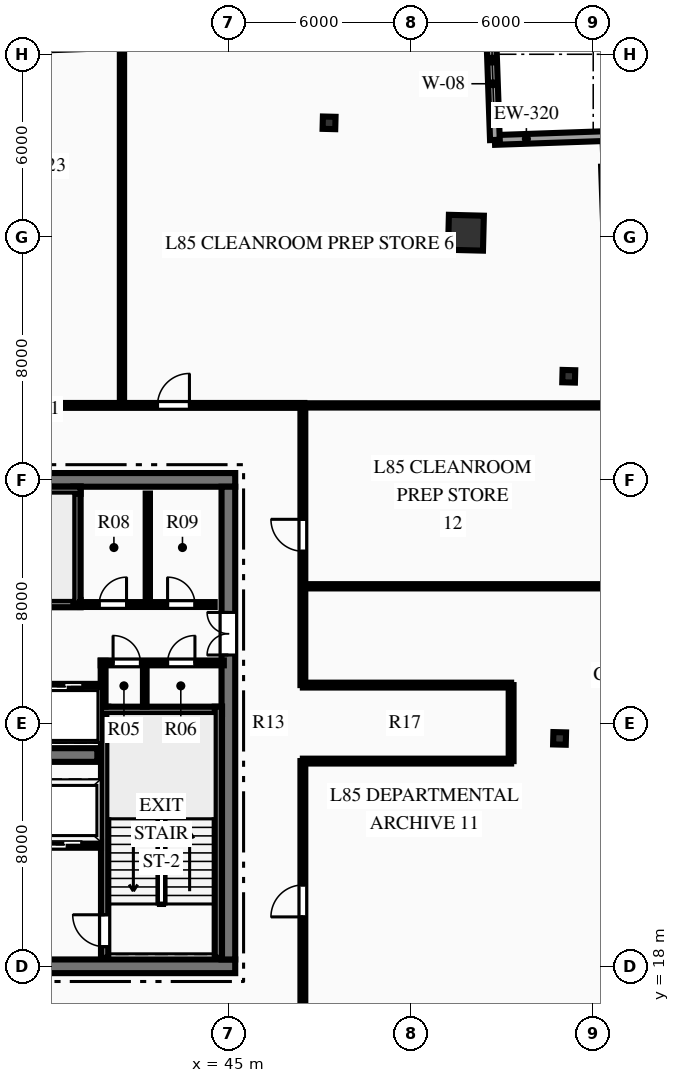
"""IFC4 building model, lengths in metres.
Left out: names, types, materials, properties, quantities, classifications, styles, units other than length and angle.
Written with IfcOpenShell. Run it as: python <this file> out.ifc"""

import sys

from ifc_helpers import new_model, si_unit, direction, frame, frame_2d, origin, origin_2d, place, context, subcontext, project, spatial, rectangle, hollow_rectangle, i_section, extrude, element, fill, save


model = new_model("IFC4")
c1 = context("Model", 3, precision=1e-05, world=origin(), true_north=direction((0.0, 1.0)))
c2 = subcontext(c1, "Body", "Model", "MODEL_VIEW")
j1 = project(units=[si_unit("LENGTHUNIT", "METRE"), si_unit("PLANEANGLEUNIT", "RADIAN")], contexts=[c1])
p1 = place(None, origin())
s1 = spatial("IfcSite", under=j1, at=p1, CompositionType="ELEMENT")
p2 = place(p1, origin())
s2 = spatial("IfcBuilding", under=s1, at=p2, CompositionType="ELEMENT")
p3 = place(p2, frame((0.0, 0.0, 336.45)))
s3 = spatial("IfcBuildingStorey", under=s2, at=p3, CompositionType="ELEMENT", Elevation=336.45)
p4 = place(p3, frame((26.775, 18.0, 0.0), z_axis=(0.0, 0.0, 1.0), x_axis=(1.0, 0.0, 0.0)))
e1 = element("IfcWall", 1, at=p4, inside=s3, PredefinedType="SHEAR", context=c2, shape_type="SweptSolid", body=[
    extrude(rectangle(XDim=18.45, YDim=0.45, at=frame_2d((9.225, 0.0))), origin(), (0.0, 0.0, 1.0), 3.75),
])
p5 = place(p4, frame((7.325, 0.0, 0.0)))
e2 = element("IfcOpeningElement", 2, at=p5, cuts=e1, PredefinedType="OPENING", context=c2, shape_type="SweptSolid", body=[
    extrude(rectangle(XDim=1.1, YDim=2.15, at=frame_2d((0.55, 1.075))), frame((0.0, 0.235, 0.0), z_axis=(0.0, -1.0, 0.0), x_axis=(1.0, 0.0, 0.0)), (0.0, 0.0, 1.0), 0.47),
])
p6 = place(p4, frame((10.025, 0.0, 0.0)))
e3 = element("IfcOpeningElement", 3, at=p6, cuts=e1, PredefinedType="OPENING", context=c2, shape_type="SweptSolid", body=[
    extrude(rectangle(XDim=1.1, YDim=2.15, at=frame_2d((0.55, 1.075))), frame((0.0, 0.235, 0.0), z_axis=(0.0, -1.0, 0.0), x_axis=(1.0, 0.0, 0.0)), (0.0, 0.0, 1.0), 0.47),
])
p7 = place(p3, frame((26.775, 34.0, 0.0), z_axis=(0.0, 0.0, 1.0), x_axis=(1.0, 0.0, 0.0)))
e4 = element("IfcWall", 4, at=p7, inside=s3, PredefinedType="SHEAR", context=c2, shape_type="SweptSolid", body=[
    extrude(rectangle(XDim=18.45, YDim=0.45, at=frame_2d((9.225, 0.0))), origin(), (0.0, 0.0, 1.0), 3.75),
])
p8 = place(p3, frame((45.0, 18.225, 0.0), z_axis=(0.0, 0.0, 1.0), x_axis=(0.0, 1.0, 0.0)))
e5 = element("IfcWall", 5, at=p8, inside=s3, PredefinedType="SHEAR", context=c2, shape_type="SweptSolid", body=[
    extrude(rectangle(XDim=15.55, YDim=0.45, at=frame_2d((7.775, 0.0))), origin(), (0.0, 0.0, 1.0), 3.75),
])
p9 = place(p8, frame((10.015, 0.0, 0.0)))
e6 = element("IfcOpeningElement", 6, at=p9, cuts=e5, PredefinedType="OPENING", context=c2, shape_type="SweptSolid", body=[
    extrude(rectangle(XDim=1.4, YDim=2.2, at=frame_2d((0.7, 1.1))), frame((0.0, 0.235, 0.0), z_axis=(0.0, -1.0, 0.0), x_axis=(1.0, 0.0, 0.0)), (0.0, 0.0, 1.0), 0.47),
])
p10 = place(p3, frame((31.31, 24.95, 0.0), z_axis=(0.0, 0.0, 1.0), x_axis=(1.0, 0.0, 0.0)))
e7 = element("IfcWall", 7, at=p10, inside=s3, PredefinedType="SHEAR", context=c2, shape_type="SweptSolid", body=[
    extrude(rectangle(XDim=9.38, YDim=0.45, at=frame_2d((4.69, 0.0))), origin(), (0.0, 0.0, 1.0), 3.75),
])
p11 = place(p3, frame((40.93, 18.28, 0.0), z_axis=(0.0, 0.0, 1.0), x_axis=(0.0, 1.0, 0.0)))
e8 = element("IfcWall", 8, at=p11, inside=s3, PredefinedType="SHEAR", context=c2, shape_type="SweptSolid", body=[
    extrude(rectangle(XDim=8.26, YDim=0.24, at=frame_2d((4.13, 0.0))), origin(), (0.0, 0.0, 1.0), 3.75),
])
p12 = place(p11, frame((0.365, 0.0, 0.0)))
e9 = element("IfcOpeningElement", 9, at=p12, cuts=e8, PredefinedType="OPENING", context=c2, shape_type="SweptSolid", body=[
    extrude(rectangle(XDim=1.05, YDim=2.15, at=frame_2d((0.525, 1.075))), frame((0.0, 0.13, 0.0), z_axis=(0.0, -1.0, 0.0), x_axis=(1.0, 0.0, 0.0)), (0.0, 0.0, 1.0), 0.26),
])
p13 = place(p3, frame((40.81, 26.42, 0.0), z_axis=(0.0, 0.0, 1.0), x_axis=(1.0, 0.0, 0.0)))
e10 = element("IfcWall", 10, at=p13, inside=s3, PredefinedType="SHEAR", context=c2, shape_type="SweptSolid", body=[
    extrude(rectangle(XDim=3.98, YDim=0.24, at=frame_2d((1.99, 0.0))), origin(), (0.0, 0.0, 1.0), 3.75),
])
p14 = place(p3, frame((44.67, 18.28, 0.0), z_axis=(0.0, 0.0, 1.0), x_axis=(0.0, 1.0, 0.0)))
e11 = element("IfcWall", 11, at=p14, inside=s3, PredefinedType="SHEAR", context=c2, shape_type="SweptSolid", body=[
    extrude(rectangle(XDim=8.26, YDim=0.24, at=frame_2d((4.13, 0.0))), origin(), (0.0, 0.0, 1.0), 3.75),
])
p15 = place(p3, frame((31.76, 29.93, 0.0), z_axis=(0.0, 0.0, 1.0), x_axis=(1.0, 0.0, 0.0)))
e12 = element("IfcWall", 12, at=p15, inside=s3, PredefinedType="SHEAR", context=c2, shape_type="SweptSolid", body=[
    extrude(rectangle(XDim=8.38, YDim=0.24, at=frame_2d((4.19, 0.0))), origin(), (0.0, 0.0, 1.0), 3.75),
])
p16 = place(p15, frame((0.565, 0.0, 0.0)))
e13 = element("IfcOpeningElement", 13, at=p16, cuts=e12, PredefinedType="OPENING", context=c2, shape_type="SweptSolid", body=[
    extrude(rectangle(XDim=1.05, YDim=2.15, at=frame_2d((0.525, 1.075))), frame((0.0, 0.13, 0.0), z_axis=(0.0, -1.0, 0.0), x_axis=(1.0, 0.0, 0.0)), (0.0, 0.0, 1.0), 0.26),
])
p17 = place(p3, frame((40.02, 29.93, 0.0), z_axis=(0.0, 0.0, 1.0), x_axis=(0.0, 1.0, 0.0)))
e14 = element("IfcWall", 14, at=p17, inside=s3, PredefinedType="SHEAR", context=c2, shape_type="SweptSolid", body=[
    extrude(rectangle(XDim=3.85, YDim=0.24, at=frame_2d((1.925, 0.0))), origin(), (0.0, 0.0, 1.0), 3.75),
])
p18 = place(p3, frame((37.85, 33.66, 0.0), z_axis=(0.0, 0.0, 1.0), x_axis=(1.0, 0.0, 0.0)))
e15 = element("IfcWall", 15, at=p18, inside=s3, PredefinedType="SHEAR", context=c2, shape_type="SweptSolid", body=[
    extrude(rectangle(XDim=2.29, YDim=0.24, at=frame_2d((1.145, 0.0))), origin(), (0.0, 0.0, 1.0), 3.75),
])
p19 = place(p3, frame((52.813, 42.13, 0.0), z_axis=(0.0, 0.0, 1.0), x_axis=(0.025304572866, 0.999679788028, 0.0)))
e16 = element("IfcColumn", 16, at=p19, inside=s3, PredefinedType="COLUMN", context=c2, shape_type="SweptSolid", body=[
    extrude(hollow_rectangle(XDim=1.15, YDim=1.15, WallThickness=0.05, at=origin_2d()), origin(), (0.0, 0.0, 1.0), 3.75),
])
for number, where, z_axis, x_axis in (
    (17, (55.894, 25.496, 0.0), (0.0, 0.0, 1.0), (0.025, 1.0, 0.0)),
    (18, (56.195, 37.409, 0.0), (0.0, 0.0, 1.0), (0.025, 1.0, 0.0)),
    (19, (48.312, 45.745, 0.0), (0.0, 0.0, 1.0), (0.025, 1.0, 0.0)),
):
    element("IfcColumn", number, at=place(p3, frame(where, z_axis=z_axis, x_axis=x_axis)), inside=s3, PredefinedType="COLUMN", context=c2, shape_type="SweptSolid", body=[
        extrude(i_section(OverallWidth=0.406, OverallDepth=0.416, WebThickness=0.03, FlangeThickness=0.048, at=origin_2d()), origin(), (0.0, 0.0, 1.0), 3.75),
    ])
p20 = place(p3, frame((53.766, 45.182, 0.0), z_axis=(0.0, 0.0, 1.0), x_axis=(0.999390619817, 0.034905429677, 0.0)))
e20 = element("IfcWall", 20, at=p20, inside=s3, PredefinedType="STANDARD", context=c2, shape_type="SweptSolid", body=[
    extrude(rectangle(XDim=3.7, YDim=0.32, at=frame_2d((1.85, 0.0))), origin(), (0.0, 0.0, 1.0), 3.49),
])
p21 = place(p3, frame((53.637, 48.879, 0.0), z_axis=(0.0, 0.0, 1.0), x_axis=(0.034905429677, -0.999390619817, 0.0)))
e21 = element("IfcWall", 21, at=p21, inside=s3, PredefinedType="STANDARD", context=c2, shape_type="SweptSolid", body=[
    extrude(rectangle(XDim=3.7, YDim=0.32, at=frame_2d((1.85, 0.0))), origin(), (0.0, 0.0, 1.0), 3.49),
])
p22 = place(p21, frame((1.2, 0.0, 0.85)))
e22 = element("IfcOpeningElement", 22, at=p22, cuts=e21, PredefinedType="OPENING", context=c2, shape_type="SweptSolid", body=[
    extrude(rectangle(XDim=1.3, YDim=1.9, at=frame_2d((0.65, 0.95))), frame((0.0, 0.17, 0.0), z_axis=(0.0, -1.0, 0.0), x_axis=(1.0, 0.0, 0.0)), (0.0, 0.0, 1.0), 0.34),
])
p23 = place(p3, frame((36.12, 22.0, 0.0), z_axis=(0.0, 0.0, 1.0), x_axis=(1.0, 0.0, 0.0)))
e23 = element("IfcWall", 23, at=p23, inside=s3, PredefinedType="PARTITIONING", context=c2, shape_type="SweptSolid", body=[
    extrude(rectangle(XDim=4.69, YDim=0.2, at=frame_2d((2.345, 0.0))), origin(), (0.0, 0.0, 1.0), 3.49),
])
p24 = place(p23, frame((2.955, 0.0, 0.0)))
e24 = element("IfcOpeningElement", 24, at=p24, cuts=e23, PredefinedType="OPENING", context=c2, shape_type="SweptSolid", body=[
    extrude(rectangle(XDim=1.1, YDim=2.15, at=frame_2d((0.55, 1.075))), frame((0.0, 0.11, 0.0), z_axis=(0.0, -1.0, 0.0), x_axis=(1.0, 0.0, 0.0)), (0.0, 0.0, 1.0), 0.22),
])
p25 = place(p23, frame((0.08, 0.0, 0.0)))
e25 = element("IfcOpeningElement", 25, at=p25, cuts=e23, PredefinedType="OPENING", context=c2, shape_type="SweptSolid", body=[
    extrude(rectangle(XDim=1.4, YDim=2.2, at=frame_2d((0.7, 1.1))), frame((0.0, 0.11, 0.0), z_axis=(0.0, -1.0, 0.0), x_axis=(1.0, 0.0, 0.0)), (0.0, 0.0, 1.0), 0.22),
])
p26 = place(p3, frame((40.8, 27.98, 0.0), z_axis=(0.0, 0.0, 1.0), x_axis=(1.0, 0.0, 0.0)))
e26 = element("IfcWall", 26, at=p26, inside=s3, PredefinedType="PARTITIONING", context=c2, shape_type="SweptSolid", body=[
    extrude(rectangle(XDim=4.05, YDim=0.16, at=frame_2d((2.025, 0.0))), origin(), (0.0, 0.0, 1.0), 3.49),
])
p27 = place(p26, frame((0.407, 0.0, 0.0)))
e27 = element("IfcOpeningElement", 27, at=p27, cuts=e26, PredefinedType="OPENING", context=c2, shape_type="SweptSolid", body=[
    extrude(rectangle(XDim=0.9, YDim=2.15, at=frame_2d((0.45, 1.075))), frame((0.0, 0.09, 0.0), z_axis=(0.0, -1.0, 0.0), x_axis=(1.0, 0.0, 0.0)), (0.0, 0.0, 1.0), 0.18),
])
p28 = place(p26, frame((2.2, 0.0, 0.0)))
e28 = element("IfcOpeningElement", 28, at=p28, cuts=e26, PredefinedType="OPENING", context=c2, shape_type="SweptSolid", body=[
    extrude(rectangle(XDim=0.9, YDim=2.15, at=frame_2d((0.45, 1.075))), frame((0.0, 0.09, 0.0), z_axis=(0.0, -1.0, 0.0), x_axis=(1.0, 0.0, 0.0)), (0.0, 0.0, 1.0), 0.18),
])
p29 = place(p3, frame((40.88, 26.54, 0.0), z_axis=(0.0, 0.0, 1.0), x_axis=(0.0, 1.0, 0.0)))
e29 = element("IfcWall", 29, at=p29, inside=s3, PredefinedType="PARTITIONING", context=c2, shape_type="SweptSolid", body=[
    extrude(rectangle(XDim=1.51, YDim=0.16, at=frame_2d((0.755, 0.0))), origin(), (0.0, 0.0, 1.0), 3.49),
])
p30 = place(p3, frame((42.25, 26.54, 0.0), z_axis=(0.0, 0.0, 1.0), x_axis=(0.0, 1.0, 0.0)))
e30 = element("IfcWall", 30, at=p30, inside=s3, PredefinedType="PARTITIONING", context=c2, shape_type="SweptSolid", body=[
    extrude(rectangle(XDim=1.44, YDim=0.12, at=frame_2d((0.72, 0.0))), origin(), (0.0, 0.0, 1.0), 3.49),
])
p31 = place(p3, frame((40.12, 29.9, 0.0), z_axis=(0.0, 0.0, 1.0), x_axis=(1.0, 0.0, 0.0)))
e31 = element("IfcWall", 31, at=p31, inside=s3, PredefinedType="PARTITIONING", context=c2, shape_type="SweptSolid", body=[
    extrude(rectangle(XDim=4.43, YDim=0.16, at=frame_2d((2.215, 0.0))), origin(), (0.0, 0.0, 1.0), 3.49),
])
p32 = place(p31, frame((0.63, 0.0, 0.0)))
e32 = element("IfcOpeningElement", 32, at=p32, cuts=e31, PredefinedType="OPENING", context=c2, shape_type="SweptSolid", body=[
    extrude(rectangle(XDim=0.9, YDim=2.15, at=frame_2d((0.45, 1.075))), frame((0.0, 0.09, 0.0), z_axis=(0.0, -1.0, 0.0), x_axis=(1.0, 0.0, 0.0)), (0.0, 0.0, 1.0), 0.18),
])
p33 = place(p31, frame((2.88, 0.0, 0.0)))
e33 = element("IfcOpeningElement", 33, at=p33, cuts=e31, PredefinedType="OPENING", context=c2, shape_type="SweptSolid", body=[
    extrude(rectangle(XDim=0.9, YDim=2.15, at=frame_2d((0.45, 1.075))), frame((0.0, 0.09, 0.0), z_axis=(0.0, -1.0, 0.0), x_axis=(1.0, 0.0, 0.0)), (0.0, 0.0, 1.0), 0.18),
])
p34 = place(p3, frame((42.35, 29.95, 0.0), z_axis=(0.0, 0.0, 1.0), x_axis=(0.0, 1.0, 0.0)))
e34 = element("IfcWall", 34, at=p34, inside=s3, PredefinedType="PARTITIONING", context=c2, shape_type="SweptSolid", body=[
    extrude(rectangle(XDim=3.6, YDim=0.14, at=frame_2d((1.8, 0.0))), origin(), (0.0, 0.0, 1.0), 3.49),
])
p35 = place(p3, frame((31.2, 27.2, 0.0), z_axis=(0.0, 0.0, 1.0), x_axis=(1.0, 0.0, 0.0)))
e35 = element("IfcWall", 35, at=p35, inside=s3, PredefinedType="PARTITIONING", context=c2, shape_type="SweptSolid", body=[
    extrude(rectangle(XDim=9.6, YDim=0.18, at=frame_2d((4.8, 0.0))), origin(), (0.0, 0.0, 1.0), 3.49),
])
p36 = place(p35, frame((0.59, 0.0, 0.0)))
e36 = element("IfcOpeningElement", 36, at=p36, cuts=e35, PredefinedType="OPENING", context=c2, shape_type="SweptSolid", body=[
    extrude(rectangle(XDim=1.1, YDim=2.15, at=frame_2d((0.55, 1.075))), frame((0.0, 0.1, 0.0), z_axis=(0.0, -1.0, 0.0), x_axis=(1.0, 0.0, 0.0)), (0.0, 0.0, 1.0), 0.2),
])
p37 = place(p35, frame((2.99, 0.0, 0.0)))
e37 = element("IfcOpeningElement", 37, at=p37, cuts=e35, PredefinedType="OPENING", context=c2, shape_type="SweptSolid", body=[
    extrude(rectangle(XDim=1.1, YDim=2.15, at=frame_2d((0.55, 1.075))), frame((0.0, 0.1, 0.0), z_axis=(0.0, -1.0, 0.0), x_axis=(1.0, 0.0, 0.0)), (0.0, 0.0, 1.0), 0.2),
])
p38 = place(p35, frame((5.51, 0.0, 0.0)))
e38 = element("IfcOpeningElement", 38, at=p38, cuts=e35, PredefinedType="OPENING", context=c2, shape_type="SweptSolid", body=[
    extrude(rectangle(XDim=1.1, YDim=2.15, at=frame_2d((0.55, 1.075))), frame((0.0, 0.1, 0.0), z_axis=(0.0, -1.0, 0.0), x_axis=(1.0, 0.0, 0.0)), (0.0, 0.0, 1.0), 0.2),
])
p39 = place(p35, frame((7.91, 0.0, 0.0)))
e39 = element("IfcOpeningElement", 39, at=p39, cuts=e35, PredefinedType="OPENING", context=c2, shape_type="SweptSolid", body=[
    extrude(rectangle(XDim=1.1, YDim=2.15, at=frame_2d((0.55, 1.075))), frame((0.0, 0.1, 0.0), z_axis=(0.0, -1.0, 0.0), x_axis=(1.0, 0.0, 0.0)), (0.0, 0.0, 1.0), 0.2),
])
p40 = place(p3, frame((37.25, 36.45, 0.0), z_axis=(0.0, 0.0, 1.0), x_axis=(1.0, 0.0, 0.0)))
e40 = element("IfcWall", 40, at=p40, inside=s3, PredefinedType="PARTITIONING", context=c2, shape_type="SweptSolid", body=[
    extrude(rectangle(XDim=10.25, YDim=0.16, at=frame_2d((5.125, 0.0))), origin(), (0.0, 0.0, 1.0), 3.49),
])
p41 = place(p40, frame((5.419, 0.0, 0.0)))
e41 = element("IfcOpeningElement", 41, at=p41, cuts=e40, PredefinedType="OPENING", context=c2, shape_type="SweptSolid", body=[
    extrude(rectangle(XDim=1.05, YDim=2.15, at=frame_2d((0.525, 1.075))), frame((0.0, 0.09, 0.0), z_axis=(0.0, -1.0, 0.0), x_axis=(1.0, 0.0, 0.0)), (0.0, 0.0, 1.0), 0.18),
])
p42 = place(p3, frame((47.45, 15.55, 0.0), z_axis=(0.0, 0.0, 1.0), x_axis=(0.0, 1.0, 0.0)))
e42 = element("IfcWall", 42, at=p42, inside=s3, PredefinedType="PARTITIONING", context=c2, shape_type="SweptSolid", body=[
    extrude(rectangle(XDim=9.2, YDim=0.16, at=frame_2d((4.6, 0.0))), origin(), (0.0, 0.0, 1.0), 3.49),
])
p43 = place(p42, frame((4.075, 0.0, 0.0)))
e43 = element("IfcOpeningElement", 43, at=p43, cuts=e42, PredefinedType="OPENING", context=c2, shape_type="SweptSolid", body=[
    extrude(rectangle(XDim=1.05, YDim=2.15, at=frame_2d((0.525, 1.075))), frame((0.0, 0.09, 0.0), z_axis=(0.0, -1.0, 0.0), x_axis=(1.0, 0.0, 0.0)), (0.0, 0.0, 1.0), 0.18),
])
p44 = place(p3, frame((47.45, 27.25, 0.0), z_axis=(0.0, 0.0, 1.0), x_axis=(0.0, 1.0, 0.0)))
e44 = element("IfcWall", 44, at=p44, inside=s3, PredefinedType="PARTITIONING", context=c2, shape_type="SweptSolid", body=[
    extrude(rectangle(XDim=9.2, YDim=0.16, at=frame_2d((4.6, 0.0))), origin(), (0.0, 0.0, 1.0), 3.49),
])
p45 = place(p44, frame((4.403, 0.0, 0.0)))
e45 = element("IfcOpeningElement", 45, at=p45, cuts=e44, PredefinedType="OPENING", context=c2, shape_type="SweptSolid", body=[
    extrude(rectangle(XDim=1.05, YDim=2.15, at=frame_2d((0.525, 1.075))), frame((0.0, 0.09, 0.0), z_axis=(0.0, -1.0, 0.0), x_axis=(1.0, 0.0, 0.0)), (0.0, 0.0, 1.0), 0.18),
])
for number, where, z_axis, x_axis in (
    (46, (47.45, 24.75, 0.0), (0.0, 0.0, 1.0), (1.0, 0.0, 0.0)),
    (47, (47.45, 27.25, 0.0), (0.0, 0.0, 1.0), (1.0, 0.0, 0.0)),
):
    element("IfcWall", number, at=place(p3, frame(where, z_axis=z_axis, x_axis=x_axis)), inside=s3, PredefinedType="PARTITIONING", context=c2, shape_type="SweptSolid", body=[
        extrude(rectangle(XDim=6.85, YDim=0.16, at=frame_2d((3.425, 0.0))), origin(), (0.0, 0.0, 1.0), 3.49),
    ])
p46 = place(p3, frame((54.3, 24.75, 0.0), z_axis=(0.0, 0.0, 1.0), x_axis=(0.0, 1.0, 0.0)))
e48 = element("IfcWall", 48, at=p46, inside=s3, PredefinedType="PARTITIONING", context=c2, shape_type="SweptSolid", body=[
    extrude(rectangle(XDim=2.5, YDim=0.16, at=frame_2d((1.25, 0.0))), origin(), (0.0, 0.0, 1.0), 3.49),
])
p47 = place(p3, frame((47.45, 36.45, 0.0), z_axis=(0.0, 0.0, 1.0), x_axis=(1.0, 0.0, 0.0)))
e49 = element("IfcWall", 49, at=p47, inside=s3, PredefinedType="PARTITIONING", context=c2, shape_type="SweptSolid", body=[
    extrude(rectangle(XDim=10.283, YDim=0.14, at=frame_2d((5.142, 0.0))), origin(), (0.0, 0.0, 1.0), 2.868),
])
p48 = place(p3, frame((41.5, 36.45, 0.0), z_axis=(0.0, 0.0, 1.0), x_axis=(0.0, 1.0, 0.0)))
e50 = element("IfcWall", 50, at=p48, inside=s3, PredefinedType="PARTITIONING", context=c2, shape_type="SweptSolid", body=[
    extrude(rectangle(XDim=11.966, YDim=0.14, at=frame_2d((5.983, 0.0))), origin(), (0.0, 0.0, 1.0), 3.49),
])
p49 = place(p3, frame((47.45, 30.5, 0.0), z_axis=(0.0, 0.0, 1.0), x_axis=(1.0, 0.0, 0.0)))
e51 = element("IfcWall", 51, at=p49, inside=s3, PredefinedType="PARTITIONING", context=c2, shape_type="SweptSolid", body=[
    extrude(rectangle(XDim=10.491, YDim=0.14, at=frame_2d((5.246, 0.0))), origin(), (0.0, 0.0, 1.0), 3.49),
])
p50 = place(p22, origin())
e52 = element("IfcWindow", 52, at=p50, inside=s3, PartitioningType="SINGLE_PANEL", PredefinedType="WINDOW", context=c2, shape_type="SweptSolid", body=[
    extrude(rectangle(XDim=1.3, YDim=1.9, at=frame_2d((0.65, 0.95))), frame((0.0, 0.03, 0.0), z_axis=(0.0, -1.0, 0.0), x_axis=(1.0, 0.0, 0.0)), (0.0, 0.0, 1.0), 0.06),
])
fill(e22, e52)
p51 = place(p27, origin())
e53 = element("IfcDoor", 53, at=p51, inside=s3, OperationType="SINGLE_SWING_LEFT", PredefinedType="DOOR", context=c2, shape_type="SweptSolid", body=[
    extrude(rectangle(XDim=0.9, YDim=2.15, at=frame_2d((0.45, 1.075))), frame((0.0, 0.025, 0.0), z_axis=(0.0, -1.0, 0.0), x_axis=(1.0, 0.0, 0.0)), (0.0, 0.0, 1.0), 0.05),
])
fill(e27, e53)
p52 = place(p28, origin())
e54 = element("IfcDoor", 54, at=p52, inside=s3, OperationType="SINGLE_SWING_RIGHT", PredefinedType="DOOR", context=c2, shape_type="SweptSolid", body=[
    extrude(rectangle(XDim=0.9, YDim=2.15, at=frame_2d((0.45, 1.075))), frame((0.0, 0.025, 0.0), z_axis=(0.0, -1.0, 0.0), x_axis=(1.0, 0.0, 0.0)), (0.0, 0.0, 1.0), 0.05),
])
fill(e28, e54)
p53 = place(p32, origin())
e55 = element("IfcDoor", 55, at=p53, inside=s3, OperationType="SINGLE_SWING_RIGHT", PredefinedType="DOOR", context=c2, shape_type="SweptSolid", body=[
    extrude(rectangle(XDim=0.9, YDim=2.15, at=frame_2d((0.45, 1.075))), frame((0.0, 0.025, 0.0), z_axis=(0.0, -1.0, 0.0), x_axis=(1.0, 0.0, 0.0)), (0.0, 0.0, 1.0), 0.05),
])
fill(e32, e55)
p54 = place(p33, origin())
e56 = element("IfcDoor", 56, at=p54, inside=s3, OperationType="SINGLE_SWING_LEFT", PredefinedType="DOOR", context=c2, shape_type="SweptSolid", body=[
    extrude(rectangle(XDim=0.9, YDim=2.15, at=frame_2d((0.45, 1.075))), frame((0.0, 0.025, 0.0), z_axis=(0.0, -1.0, 0.0), x_axis=(1.0, 0.0, 0.0)), (0.0, 0.0, 1.0), 0.05),
])
fill(e33, e56)
p55 = place(p12, origin())
e57 = element("IfcDoor", 57, at=p55, inside=s3, OperationType="SINGLE_SWING_RIGHT", PredefinedType="DOOR", context=c2, shape_type="SweptSolid", body=[
    extrude(rectangle(XDim=1.05, YDim=2.15, at=frame_2d((0.525, 1.075))), frame((0.0, 0.025, 0.0), z_axis=(0.0, -1.0, 0.0), x_axis=(1.0, 0.0, 0.0)), (0.0, 0.0, 1.0), 0.05),
])
fill(e9, e57)
p56 = place(p9, origin())
e58 = element("IfcDoor", 58, at=p56, inside=s3, OperationType="DOUBLE_DOOR_SINGLE_SWING", PredefinedType="DOOR", context=c2, shape_type="SweptSolid", body=[
    extrude(rectangle(XDim=1.4, YDim=2.2, at=frame_2d((0.7, 1.1))), frame((0.0, 0.025, 0.0), z_axis=(0.0, -1.0, 0.0), x_axis=(1.0, 0.0, 0.0)), (0.0, 0.0, 1.0), 0.05),
])
fill(e6, e58)
p57 = place(p41, origin())
e59 = element("IfcDoor", 59, at=p57, inside=s3, OperationType="SINGLE_SWING_RIGHT", PredefinedType="DOOR", context=c2, shape_type="SweptSolid", body=[
    extrude(rectangle(XDim=1.05, YDim=2.15, at=frame_2d((0.525, 1.075))), frame((0.0, 0.025, 0.0), z_axis=(0.0, -1.0, 0.0), x_axis=(1.0, 0.0, 0.0)), (0.0, 0.0, 1.0), 0.05),
])
fill(e41, e59)
p58 = place(p43, origin())
e60 = element("IfcDoor", 60, at=p58, inside=s3, OperationType="SINGLE_SWING_LEFT", PredefinedType="DOOR", context=c2, shape_type="SweptSolid", body=[
    extrude(rectangle(XDim=1.05, YDim=2.15, at=frame_2d((0.525, 1.075))), frame((0.0, 0.025, 0.0), z_axis=(0.0, -1.0, 0.0), x_axis=(1.0, 0.0, 0.0)), (0.0, 0.0, 1.0), 0.05),
])
fill(e43, e60)
p59 = place(p45, origin())
e61 = element("IfcDoor", 61, at=p59, inside=s3, OperationType="SINGLE_SWING_RIGHT", PredefinedType="DOOR", context=c2, shape_type="SweptSolid", body=[
    extrude(rectangle(XDim=1.05, YDim=2.15, at=frame_2d((0.525, 1.075))), frame((0.0, 0.025, 0.0), z_axis=(0.0, -1.0, 0.0), x_axis=(1.0, 0.0, 0.0)), (0.0, 0.0, 1.0), 0.05),
])
fill(e45, e61)
p60 = place(p39, origin())
e62 = element("IfcDoor", 62, at=p60, inside=s3, OperationType="SLIDING_TO_LEFT", PredefinedType="DOOR", context=c2, shape_type="SweptSolid", body=[
    extrude(rectangle(XDim=1.1, YDim=2.15, at=frame_2d((0.55, 1.075))), frame((0.0, 0.025, 0.0), z_axis=(0.0, -1.0, 0.0), x_axis=(1.0, 0.0, 0.0)), (0.0, 0.0, 1.0), 0.05),
])
fill(e39, e62)
p61 = place(p24, origin())
e63 = element("IfcDoor", 63, at=p61, inside=s3, OperationType="SLIDING_TO_LEFT", PredefinedType="DOOR", context=c2, shape_type="SweptSolid", body=[
    extrude(rectangle(XDim=1.1, YDim=2.15, at=frame_2d((0.55, 1.075))), frame((0.0, 0.025, 0.0), z_axis=(0.0, -1.0, 0.0), x_axis=(1.0, 0.0, 0.0)), (0.0, 0.0, 1.0), 0.05),
])
fill(e24, e63)
save(model, sys.argv[1])
